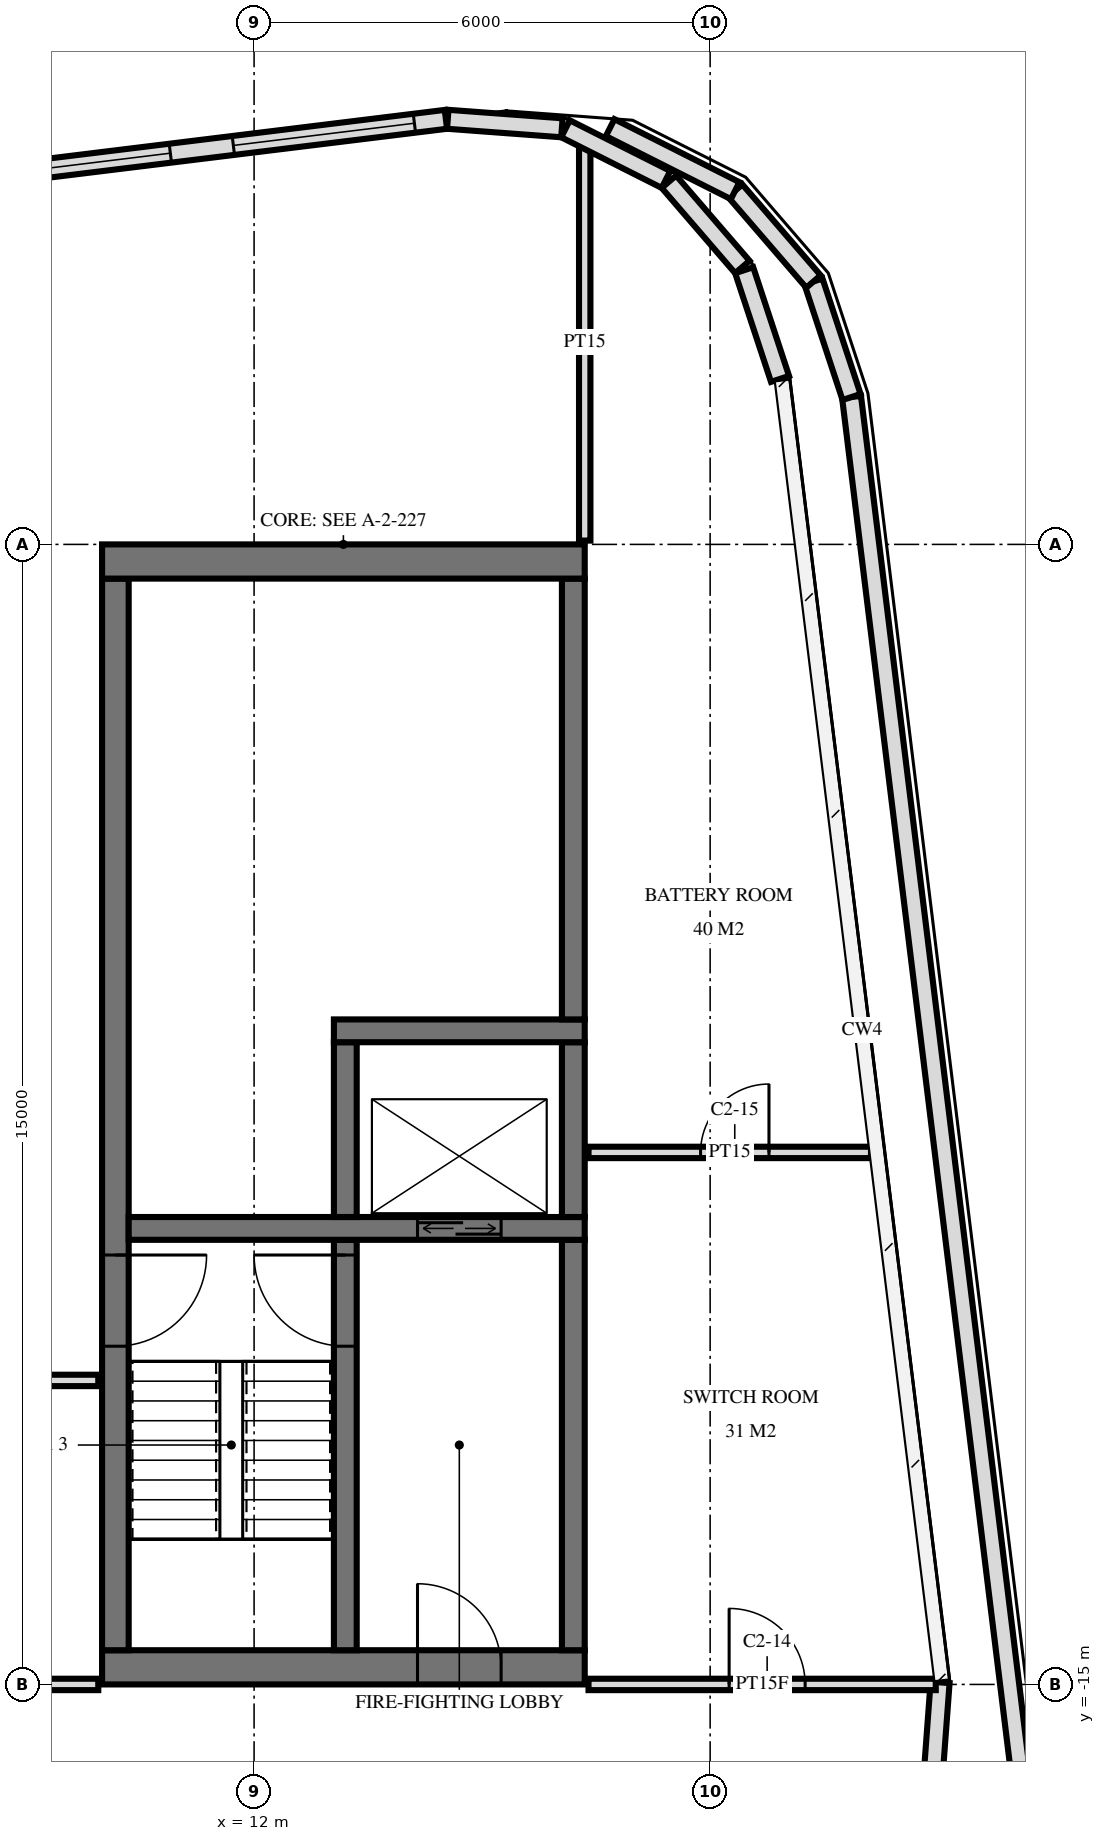
"""IFC4 building model, lengths in metres.
Left out: names, types, materials, properties, quantities, classifications, styles, units other than length and angle.
Written with IfcOpenShell. Run it as: python <this file> out.ifc"""

import sys

from ifc_helpers import new_model, si_unit, direction, frame, frame_2d, origin, place, context, subcontext, project, spatial, rectangle, extrude, element, fill, save


model = new_model("IFC4")
c1 = context("Model", 3, precision=1e-05, world=origin(), true_north=direction((0.0, 1.0)))
c2 = subcontext(c1, "Body", "Model", "MODEL_VIEW")
j1 = project(units=[si_unit("LENGTHUNIT", "METRE"), si_unit("PLANEANGLEUNIT", "RADIAN")], contexts=[c1])
p1 = place(None, origin())
s1 = spatial("IfcSite", under=j1, at=p1, CompositionType="ELEMENT")
p2 = place(p1, origin())
s2 = spatial("IfcBuilding", under=s1, at=p2, CompositionType="ELEMENT")
p3 = place(p2, frame((0.0, 0.0, 350.2)))
s3 = spatial("IfcBuildingStorey", under=s2, at=p3, CompositionType="ELEMENT", Elevation=350.2)
p4 = place(p3, frame((10.0, -0.225, 0.0), z_axis=(0.0, 0.0, 1.0), x_axis=(1.0, 0.0, 0.0)))
e1 = element("IfcWall", 1, at=p4, inside=s3, PredefinedType="SHEAR", context=c2, shape_type="SweptSolid", body=[
    extrude(rectangle(XDim=6.35, YDim=0.45, at=frame_2d((3.175, 0.0))), origin(), (0.0, 0.0, 1.0), 3.6),
])
p5 = place(p3, frame((10.0, -14.775, 0.0), z_axis=(0.0, 0.0, 1.0), x_axis=(1.0, 0.0, 0.0)))
e2 = element("IfcWall", 2, at=p5, inside=s3, PredefinedType="SHEAR", context=c2, shape_type="SweptSolid", body=[
    extrude(rectangle(XDim=6.35, YDim=0.45, at=frame_2d((3.175, 0.0))), origin(), (0.0, 0.0, 1.0), 3.6),
])
p6 = place(p5, frame((4.15, 0.0, 0.0)))
e3 = element("IfcOpeningElement", 3, at=p6, cuts=e2, PredefinedType="OPENING", context=c2, shape_type="SweptSolid", body=[
    extrude(rectangle(XDim=1.1, YDim=2.1, at=frame_2d((0.55, 1.05))), frame((0.0, 0.235, 0.0), z_axis=(0.0, -1.0, 0.0), x_axis=(1.0, 0.0, 0.0)), (0.0, 0.0, 1.0), 0.47),
])
p7 = place(p3, frame((10.175, -14.55, 0.0), z_axis=(0.0, 0.0, 1.0), x_axis=(0.0, 1.0, 0.0)))
e4 = element("IfcWall", 4, at=p7, inside=s3, PredefinedType="SHEAR", context=c2, shape_type="SweptSolid", body=[
    extrude(rectangle(XDim=14.1, YDim=0.35, at=frame_2d((7.05, 0.0))), origin(), (0.0, 0.0, 1.0), 3.6),
])
p8 = place(p7, frame((4.0, 0.0, 0.0)))
e5 = element("IfcOpeningElement", 5, at=p8, cuts=e4, PredefinedType="OPENING", context=c2, shape_type="SweptSolid", body=[
    extrude(rectangle(XDim=1.2, YDim=2.1, at=frame_2d((0.6, 1.05))), frame((0.0, 0.185, 0.0), z_axis=(0.0, -1.0, 0.0), x_axis=(1.0, 0.0, 0.0)), (0.0, 0.0, 1.0), 0.37),
])
p9 = place(p3, frame((16.2, -6.25, 0.0), z_axis=(0.0, 0.0, 1.0), x_axis=(0.0, 1.0, 0.0)))
e6 = element("IfcWall", 6, at=p9, inside=s3, PredefinedType="SHEAR", context=c2, shape_type="SweptSolid", body=[
    extrude(rectangle(XDim=5.8, YDim=0.3, at=frame_2d((2.9, 0.0))), origin(), (0.0, 0.0, 1.0), 3.6),
])
p10 = place(p3, frame((16.2, -14.55, 0.0), z_axis=(0.0, 0.0, 1.0), x_axis=(0.0, 1.0, 0.0)))
e7 = element("IfcWall", 7, at=p10, inside=s3, PredefinedType="SHEAR", context=c2, shape_type="SweptSolid", body=[
    extrude(rectangle(XDim=5.4, YDim=0.3, at=frame_2d((2.7, 0.0))), origin(), (0.0, 0.0, 1.0), 3.6),
])
p11 = place(p3, frame((10.35, -9.0, 0.0), z_axis=(0.0, 0.0, 1.0), x_axis=(1.0, 0.0, 0.0)))
e8 = element("IfcWall", 8, at=p11, inside=s3, PredefinedType="SHEAR", context=c2, shape_type="SweptSolid", body=[
    extrude(rectangle(XDim=6.0, YDim=0.3, at=frame_2d((3.0, 0.0))), origin(), (0.0, 0.0, 1.0), 3.6),
])
p12 = place(p11, frame((3.8, 0.0, 0.0)))
e9 = element("IfcOpeningElement", 9, at=p12, cuts=e8, PredefinedType="OPENING", context=c2, shape_type="SweptSolid", body=[
    extrude(rectangle(XDim=1.1, YDim=2.1, at=frame_2d((0.55, 1.05))), frame((0.0, 0.16, 0.0), z_axis=(0.0, -1.0, 0.0), x_axis=(1.0, 0.0, 0.0)), (0.0, 0.0, 1.0), 0.32),
])
p13 = place(p3, frame((13.2, -14.55, 0.0), z_axis=(0.0, 0.0, 1.0), x_axis=(0.0, 1.0, 0.0)))
e10 = element("IfcWall", 10, at=p13, inside=s3, PredefinedType="SHEAR", context=c2, shape_type="SweptSolid", body=[
    extrude(rectangle(XDim=5.4, YDim=0.3, at=frame_2d((2.7, 0.0))), origin(), (0.0, 0.0, 1.0), 3.6),
])
p14 = place(p13, frame((4.0, 0.0, 0.0)))
e11 = element("IfcOpeningElement", 11, at=p14, cuts=e10, PredefinedType="OPENING", context=c2, shape_type="SweptSolid", body=[
    extrude(rectangle(XDim=1.2, YDim=2.1, at=frame_2d((0.6, 1.05))), frame((0.0, 0.16, 0.0), z_axis=(0.0, -1.0, 0.0), x_axis=(1.0, 0.0, 0.0)), (0.0, 0.0, 1.0), 0.32),
])
p15 = place(p3, frame((13.05, -6.4, 0.0), z_axis=(0.0, 0.0, 1.0), x_axis=(1.0, 0.0, 0.0)))
e12 = element("IfcWall", 12, at=p15, inside=s3, PredefinedType="SHEAR", context=c2, shape_type="SweptSolid", body=[
    extrude(rectangle(XDim=3.3, YDim=0.3, at=frame_2d((1.65, 0.0))), origin(), (0.0, 0.0, 1.0), 3.6),
])
for number, where, z_axis, x_axis in (
    (13, (13.2, -8.85, 0.0), (0.0, 0.0, 1.0), (0.0, 1.0, 0.0)),
    (14, (16.2, -8.85, 0.0), (0.0, 0.0, 1.0), (0.0, 1.0, 0.0)),
):
    element("IfcWall", number, at=place(p3, frame(where, z_axis=z_axis, x_axis=x_axis)), inside=s3, PredefinedType="SHEAR", context=c2, shape_type="SweptSolid", body=[
        extrude(rectangle(XDim=2.3, YDim=0.3, at=frame_2d((1.15, 0.0))), origin(), (0.0, 0.0, 1.0), 3.6),
    ])
p16 = place(p3, frame((18.92, 2.177, 0.0), z_axis=(0.0, 0.0, 1.0), x_axis=(-0.313162570297, 0.949699533834, 0.0)))
e15 = element("IfcWall", 15, at=p16, inside=s3, PredefinedType="SOLIDWALL", context=c2, shape_type="SweptSolid", body=[
    extrude(rectangle(XDim=1.506, YDim=0.25, at=frame_2d((0.753, 0.0))), origin(), (0.0, 0.0, 1.0), 3.32),
])
p17 = place(p3, frame((18.424, 3.65, 0.0), z_axis=(0.0, 0.0, 1.0), x_axis=(-0.65281239985, 0.757519617305, 0.0)))
e16 = element("IfcWall", 16, at=p17, inside=s3, PredefinedType="SOLIDWALL", context=c2, shape_type="SweptSolid", body=[
    extrude(rectangle(XDim=1.481, YDim=0.25, at=frame_2d((0.74, 0.0))), origin(), (0.0, 0.0, 1.0), 3.32),
])
p18 = place(p3, frame((17.419, 4.802, 0.0), z_axis=(0.0, 0.0, 1.0), x_axis=(-0.893004966714, 0.450046808036, 0.0)))
e17 = element("IfcWall", 17, at=p18, inside=s3, PredefinedType="SOLIDWALL", context=c2, shape_type="SweptSolid", body=[
    extrude(rectangle(XDim=1.481, YDim=0.25, at=frame_2d((0.74, 0.0))), origin(), (0.0, 0.0, 1.0), 3.32),
])
p19 = place(p3, frame((16.05, 5.482, 0.0), z_axis=(0.0, 0.0, 1.0), x_axis=(-0.997251362315, 0.074092647143, 0.0)))
e18 = element("IfcWall", 18, at=p19, inside=s3, PredefinedType="SOLIDWALL", context=c2, shape_type="SweptSolid", body=[
    extrude(rectangle(XDim=1.506, YDim=0.25, at=frame_2d((0.753, 0.0))), origin(), (0.0, 0.0, 1.0), 3.32),
])
p20 = place(p3, frame((14.524, 5.593, 0.0), z_axis=(0.0, 0.0, 1.0), x_axis=(-0.992546946727, -0.121862867777, 0.0)))
e19 = element("IfcWall", 19, at=p20, inside=s3, PredefinedType="SOLIDWALL", context=c2, shape_type="SweptSolid", body=[
    extrude(rectangle(XDim=32.351, YDim=0.25, at=frame_2d((16.176, 0.0))), origin(), (0.0, 0.0, 1.0), 3.32),
])
p21 = place(p20, frame((0.417, 0.0, 0.498)))
e20 = element("IfcOpeningElement", 20, at=p21, cuts=e19, PredefinedType="OPENING", context=c2, shape_type="SweptSolid", body=[
    extrude(rectangle(XDim=2.4, YDim=2.622, at=frame_2d((1.2, 1.311))), frame((0.0, 0.135, 0.0), z_axis=(0.0, -1.0, 0.0), x_axis=(1.0, 0.0, 0.0)), (0.0, 0.0, 1.0), 0.27),
])
p22 = place(p20, frame((3.653, 0.0, 0.498)))
e21 = element("IfcOpeningElement", 21, at=p22, cuts=e19, PredefinedType="OPENING", context=c2, shape_type="SweptSolid", body=[
    extrude(rectangle(XDim=2.4, YDim=2.622, at=frame_2d((1.2, 1.311))), frame((0.0, 0.135, 0.0), z_axis=(0.0, -1.0, 0.0), x_axis=(1.0, 0.0, 0.0)), (0.0, 0.0, 1.0), 0.27),
])
p23 = place(p20, frame((6.888, 0.0, 0.498)))
e22 = element("IfcOpeningElement", 22, at=p23, cuts=e19, PredefinedType="OPENING", context=c2, shape_type="SweptSolid", body=[
    extrude(rectangle(XDim=2.4, YDim=2.622, at=frame_2d((1.2, 1.311))), frame((0.0, 0.135, 0.0), z_axis=(0.0, -1.0, 0.0), x_axis=(1.0, 0.0, 0.0)), (0.0, 0.0, 1.0), 0.27),
])
p24 = place(p20, frame((10.123, 0.0, 0.498)))
e23 = element("IfcOpeningElement", 23, at=p24, cuts=e19, PredefinedType="OPENING", context=c2, shape_type="SweptSolid", body=[
    extrude(rectangle(XDim=2.4, YDim=2.622, at=frame_2d((1.2, 1.311))), frame((0.0, 0.135, 0.0), z_axis=(0.0, -1.0, 0.0), x_axis=(1.0, 0.0, 0.0)), (0.0, 0.0, 1.0), 0.27),
])
p25 = place(p20, frame((13.358, 0.0, 0.498)))
e24 = element("IfcOpeningElement", 24, at=p25, cuts=e19, PredefinedType="OPENING", context=c2, shape_type="SweptSolid", body=[
    extrude(rectangle(XDim=2.4, YDim=2.622, at=frame_2d((1.2, 1.311))), frame((0.0, 0.135, 0.0), z_axis=(0.0, -1.0, 0.0), x_axis=(1.0, 0.0, 0.0)), (0.0, 0.0, 1.0), 0.27),
])
p26 = place(p20, frame((16.593, 0.0, 0.498)))
e25 = element("IfcOpeningElement", 25, at=p26, cuts=e19, PredefinedType="OPENING", context=c2, shape_type="SweptSolid", body=[
    extrude(rectangle(XDim=2.4, YDim=2.622, at=frame_2d((1.2, 1.311))), frame((0.0, 0.135, 0.0), z_axis=(0.0, -1.0, 0.0), x_axis=(1.0, 0.0, 0.0)), (0.0, 0.0, 1.0), 0.27),
])
p27 = place(p20, frame((19.828, 0.0, 0.498)))
e26 = element("IfcOpeningElement", 26, at=p27, cuts=e19, PredefinedType="OPENING", context=c2, shape_type="SweptSolid", body=[
    extrude(rectangle(XDim=2.4, YDim=2.622, at=frame_2d((1.2, 1.311))), frame((0.0, 0.135, 0.0), z_axis=(0.0, -1.0, 0.0), x_axis=(1.0, 0.0, 0.0)), (0.0, 0.0, 1.0), 0.27),
])
p28 = place(p20, frame((23.063, 0.0, 0.498)))
e27 = element("IfcOpeningElement", 27, at=p28, cuts=e19, PredefinedType="OPENING", context=c2, shape_type="SweptSolid", body=[
    extrude(rectangle(XDim=2.4, YDim=2.622, at=frame_2d((1.2, 1.311))), frame((0.0, 0.135, 0.0), z_axis=(0.0, -1.0, 0.0), x_axis=(1.0, 0.0, 0.0)), (0.0, 0.0, 1.0), 0.27),
])
p29 = place(p20, frame((26.298, 0.0, 0.498)))
e28 = element("IfcOpeningElement", 28, at=p29, cuts=e19, PredefinedType="OPENING", context=c2, shape_type="SweptSolid", body=[
    extrude(rectangle(XDim=2.4, YDim=2.622, at=frame_2d((1.2, 1.311))), frame((0.0, 0.135, 0.0), z_axis=(0.0, -1.0, 0.0), x_axis=(1.0, 0.0, 0.0)), (0.0, 0.0, 1.0), 0.27),
])
p30 = place(p20, frame((29.533, 0.0, 0.498)))
e29 = element("IfcOpeningElement", 29, at=p30, cuts=e19, PredefinedType="OPENING", context=c2, shape_type="SweptSolid", body=[
    extrude(rectangle(XDim=2.4, YDim=2.622, at=frame_2d((1.2, 1.311))), frame((0.0, 0.135, 0.0), z_axis=(0.0, -1.0, 0.0), x_axis=(1.0, 0.0, 0.0)), (0.0, 0.0, 1.0), 0.27),
])
p31 = place(p3, frame((20.914, -16.475, 0.0), z_axis=(0.0, 0.0, 1.0), x_axis=(0.074092647143, 0.997251362315, 0.0)))
e30 = element("IfcWall", 30, at=p31, inside=s3, PredefinedType="SOLIDWALL", context=c2, shape_type="SweptSolid", body=[
    extrude(rectangle(XDim=1.506, YDim=0.25, at=frame_2d((0.753, 0.0))), origin(), (0.0, 0.0, 1.0), 3.32),
])
p32 = place(p3, frame((16.685, 5.484, 0.0), z_axis=(0.0, 0.0, 1.0), x_axis=(0.892964428265, -0.450127237404, 0.0)))
e31 = element("IfcWall", 31, at=p32, inside=s3, PredefinedType="PARAPET", context=c2, shape_type="SweptSolid", body=[
    extrude(rectangle(XDim=1.842, YDim=0.25, at=frame_2d((0.921, 0.0))), origin(), (0.0, 0.0, 1.0), 1.1),
])
p33 = place(p3, frame((18.329, 4.655, 0.0), z_axis=(0.0, 0.0, 1.0), x_axis=(0.652801907611, -0.75752865914, 0.0)))
e32 = element("IfcWall", 32, at=p33, inside=s3, PredefinedType="PARAPET", context=c2, shape_type="SweptSolid", body=[
    extrude(rectangle(XDim=1.578, YDim=0.25, at=frame_2d((0.789, 0.0))), origin(), (0.0, 0.0, 1.0), 1.1),
])
p34 = place(p3, frame((19.36, 3.459, 0.0), z_axis=(0.0, 0.0, 1.0), x_axis=(0.313067872961, -0.949730754962, 0.0)))
e33 = element("IfcWall", 33, at=p34, inside=s3, PredefinedType="PARAPET", context=c2, shape_type="SweptSolid", body=[
    extrude(rectangle(XDim=1.6, YDim=0.25, at=frame_2d((0.8, 0.0))), origin(), (0.0, 0.0, 1.0), 1.1),
])
p35 = place(p3, frame((19.861, 1.939, 0.0), z_axis=(0.0, 0.0, 1.0), x_axis=(0.121873189279, -0.99254567942, 0.0)))
e34 = element("IfcWall", 34, at=p35, inside=s3, PredefinedType="PARAPET", context=c2, shape_type="SweptSolid", body=[
    extrude(rectangle(XDim=18.171, YDim=0.25, at=frame_2d((9.086, 0.0))), origin(), (0.0, 0.0, 1.0), 1.1),
])
p36 = place(p3, frame((16.35, 0.05, 0.0), z_axis=(0.0, 0.0, 1.0), x_axis=(0.0, 1.0, 0.0)))
e35 = element("IfcWall", 35, at=p36, inside=s3, PredefinedType="PARTITIONING", context=c2, shape_type="SweptSolid", body=[
    extrude(rectangle(XDim=5.229, YDim=0.15, at=frame_2d((2.615, 0.0))), origin(), (0.0, 0.0, 1.0), 3.32),
])
p37 = place(p3, frame((-9.95, -15.0, 0.0), z_axis=(0.0, 0.0, 1.0), x_axis=(1.0, 0.0, 0.0)))
e36 = element("IfcWall", 36, at=p37, inside=s3, PredefinedType="PARTITIONING", context=c2, shape_type="SweptSolid", body=[
    extrude(rectangle(XDim=19.9, YDim=0.15, at=frame_2d((9.95, 0.0))), origin(), (0.0, 0.0, 1.0), 2.684),
])
p38 = place(p37, frame((9.43, 0.0, 0.0)))
e37 = element("IfcOpeningElement", 37, at=p38, cuts=e36, PredefinedType="OPENING", context=c2, shape_type="SweptSolid", body=[
    extrude(rectangle(XDim=1.0, YDim=2.1, at=frame_2d((0.5, 1.05))), frame((0.0, 0.085, 0.0), z_axis=(0.0, -1.0, 0.0), x_axis=(1.0, 0.0, 0.0)), (0.0, 0.0, 1.0), 0.17),
])
p39 = place(p3, frame((16.4, -15.0, 0.0), z_axis=(0.0, 0.0, 1.0), x_axis=(1.0, 0.0, 0.0)))
e38 = element("IfcWall", 38, at=p39, inside=s3, PredefinedType="PARTITIONING", context=c2, shape_type="SweptSolid", body=[
    extrude(rectangle(XDim=4.569, YDim=0.15, at=frame_2d((2.284, 0.0))), origin(), (0.0, 0.0, 1.0), 3.32),
])
p40 = place(p39, frame((1.85, 0.0, 0.0)))
e39 = element("IfcOpeningElement", 39, at=p40, cuts=e38, PredefinedType="OPENING", context=c2, shape_type="SweptSolid", body=[
    extrude(rectangle(XDim=1.0, YDim=2.1, at=frame_2d((0.5, 1.05))), frame((0.0, 0.085, 0.0), z_axis=(0.0, -1.0, 0.0), x_axis=(1.0, 0.0, 0.0)), (0.0, 0.0, 1.0), 0.17),
])
p41 = place(p3, frame((-9.95, -11.0, 0.0), z_axis=(0.0, 0.0, 1.0), x_axis=(1.0, 0.0, 0.0)))
e40 = element("IfcWall", 40, at=p41, inside=s3, PredefinedType="PARTITIONING", context=c2, shape_type="SweptSolid", body=[
    extrude(rectangle(XDim=19.9, YDim=0.15, at=frame_2d((9.95, 0.0))), origin(), (0.0, 0.0, 1.0), 3.32),
])
p42 = place(p3, frame((16.4, -8.0, 0.0), z_axis=(0.0, 0.0, 1.0), x_axis=(1.0, 0.0, 0.0)))
e41 = element("IfcWall", 41, at=p42, inside=s3, PredefinedType="PARTITIONING", context=c2, shape_type="SweptSolid", body=[
    extrude(rectangle(XDim=3.716, YDim=0.15, at=frame_2d((1.858, 0.0))), origin(), (0.0, 0.0, 1.0), 3.32),
])
p43 = place(p42, frame((1.474, 0.0, 0.0)))
e42 = element("IfcOpeningElement", 42, at=p43, cuts=e41, PredefinedType="OPENING", context=c2, shape_type="SweptSolid", body=[
    extrude(rectangle(XDim=0.9, YDim=2.1, at=frame_2d((0.45, 1.05))), frame((0.0, 0.085, 0.0), z_axis=(0.0, -1.0, 0.0), x_axis=(1.0, 0.0, 0.0)), (0.0, 0.0, 1.0), 0.17),
])
p44 = place(p21, origin())
e43 = element("IfcWindow", 43, at=p44, inside=s3, PartitioningType="SINGLE_PANEL", PredefinedType="USERDEFINED", context=c2, shape_type="SweptSolid", body=[
    extrude(rectangle(XDim=2.4, YDim=2.622, at=frame_2d((1.2, 1.311))), frame((0.0, 0.03, 0.0), z_axis=(0.0, -1.0, 0.0), x_axis=(1.0, 0.0, 0.0)), (0.0, 0.0, 1.0), 0.06),
])
fill(e20, e43)
p45 = place(p22, origin())
e44 = element("IfcWindow", 44, at=p45, inside=s3, PartitioningType="SINGLE_PANEL", PredefinedType="USERDEFINED", context=c2, shape_type="SweptSolid", body=[
    extrude(rectangle(XDim=2.4, YDim=2.622, at=frame_2d((1.2, 1.311))), frame((0.0, 0.03, 0.0), z_axis=(0.0, -1.0, 0.0), x_axis=(1.0, 0.0, 0.0)), (0.0, 0.0, 1.0), 0.06),
])
fill(e21, e44)
p46 = place(p12, origin())
e45 = element("IfcDoor", 45, at=p46, inside=s3, OperationType="DOUBLE_DOOR_SLIDING", PredefinedType="USERDEFINED", context=c2, shape_type="SweptSolid", body=[
    extrude(rectangle(XDim=1.1, YDim=2.1, at=frame_2d((0.55, 1.05))), frame((0.0, 0.025, 0.0), z_axis=(0.0, -1.0, 0.0), x_axis=(1.0, 0.0, 0.0)), (0.0, 0.0, 1.0), 0.05),
])
fill(e9, e45)
p47 = place(p8, frame((0.6, 0.0, 0.0), z_axis=(0.0, 0.0, 1.0), x_axis=(-1.0, 0.0, 0.0)))
e46 = element("IfcDoor", 46, at=p47, inside=s3, OperationType="SINGLE_SWING_RIGHT", PredefinedType="DOOR", context=c2, shape_type="SweptSolid", body=[
    extrude(rectangle(XDim=1.2, YDim=2.1, at=frame_2d((0.0, 1.05))), frame((0.0, -0.025, 0.0), z_axis=(0.0, 1.0, 0.0), x_axis=(-1.0, 0.0, 0.0)), (0.0, 0.0, 1.0), 0.05),
])
fill(e5, e46)
p48 = place(p6, origin())
e47 = element("IfcDoor", 47, at=p48, inside=s3, OperationType="SINGLE_SWING_RIGHT", PredefinedType="DOOR", context=c2, shape_type="SweptSolid", body=[
    extrude(rectangle(XDim=1.1, YDim=2.1, at=frame_2d((0.55, 1.05))), frame((0.0, 0.025, 0.0), z_axis=(0.0, -1.0, 0.0), x_axis=(1.0, 0.0, 0.0)), (0.0, 0.0, 1.0), 0.05),
])
fill(e3, e47)
p49 = place(p14, origin())
e48 = element("IfcDoor", 48, at=p49, inside=s3, OperationType="SINGLE_SWING_LEFT", PredefinedType="DOOR", context=c2, shape_type="SweptSolid", body=[
    extrude(rectangle(XDim=1.2, YDim=2.1, at=frame_2d((0.6, 1.05))), frame((0.0, 0.025, 0.0), z_axis=(0.0, -1.0, 0.0), x_axis=(1.0, 0.0, 0.0)), (0.0, 0.0, 1.0), 0.05),
])
fill(e11, e48)
p50 = place(p40, origin())
e49 = element("IfcDoor", 49, at=p50, inside=s3, OperationType="SINGLE_SWING_RIGHT", PredefinedType="DOOR", context=c2, shape_type="SweptSolid", body=[
    extrude(rectangle(XDim=1.0, YDim=2.1, at=frame_2d((0.5, 1.05))), frame((0.0, 0.025, 0.0), z_axis=(0.0, -1.0, 0.0), x_axis=(1.0, 0.0, 0.0)), (0.0, 0.0, 1.0), 0.05),
])
fill(e39, e49)
p51 = place(p43, origin())
e50 = element("IfcDoor", 50, at=p51, inside=s3, OperationType="SINGLE_SWING_LEFT", PredefinedType="DOOR", context=c2, shape_type="SweptSolid", body=[
    extrude(rectangle(XDim=0.9, YDim=2.1, at=frame_2d((0.45, 1.05))), frame((0.0, 0.025, 0.0), z_axis=(0.0, -1.0, 0.0), x_axis=(1.0, 0.0, 0.0)), (0.0, 0.0, 1.0), 0.05),
])
fill(e42, e50)
save(model, sys.argv[1])
